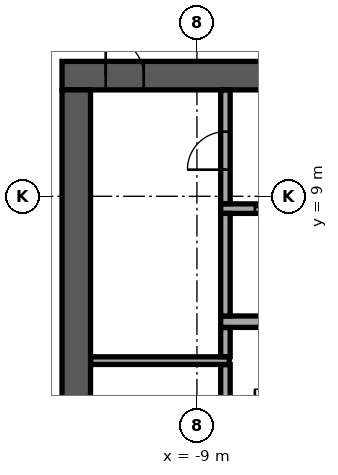
"""IFC4 building model, lengths in metres.
Left out: names, types, materials, properties, quantities, classifications, styles, units other than length and angle.
Written with IfcOpenShell. Run it as: python <this file> out.ifc"""

import sys

from ifc_helpers import new_model, si_unit, direction, frame, frame_2d, origin, place, context, subcontext, project, spatial, rectangle, extrude, element, fill, save


model = new_model("IFC4")
c1 = context("Model", 3, precision=1e-05, world=origin(), true_north=direction((0.0, 1.0)))
c2 = subcontext(c1, "Body", "Model", "MODEL_VIEW")
j1 = project(units=[si_unit("LENGTHUNIT", "METRE"), si_unit("PLANEANGLEUNIT", "RADIAN")], contexts=[c1])
p1 = place(None, origin())
s1 = spatial("IfcSite", under=j1, at=p1, CompositionType="ELEMENT")
p2 = place(p1, origin())
s2 = spatial("IfcBuilding", under=s1, at=p2, CompositionType="ELEMENT")
p3 = place(p2, frame((0.0, 0.0, 254.9)))
s3 = spatial("IfcBuildingStorey", under=s2, at=p3, CompositionType="ELEMENT", Elevation=254.9)
p4 = place(p3, frame((-12.55, 12.175, 0.0), z_axis=(0.0, 0.0, 1.0), x_axis=(1.0, 0.0, 0.0)))
e1 = element("IfcWall", 1, at=p4, inside=s3, PredefinedType="SHEAR", context=c2, shape_type="SweptSolid", body=[
    extrude(rectangle(XDim=25.1, YDim=0.75, at=frame_2d((12.55, 0.0))), origin(), (0.0, 0.0, 1.0), 3.64),
])
p5 = place(p4, frame((11.35, 0.0, 0.0)))
e2 = element("IfcOpeningElement", 2, at=p5, cuts=e1, PredefinedType="OPENING", context=c2, shape_type="SweptSolid", body=[
    extrude(rectangle(XDim=2.4, YDim=2.4, at=frame_2d((1.2, 1.2))), frame((0.0, 0.385, 0.0), z_axis=(0.0, -1.0, 0.0), x_axis=(1.0, 0.0, 0.0)), (0.0, 0.0, 1.0), 0.77),
])
p6 = place(p4, frame((22.175, 0.0, 0.0)))
e3 = element("IfcOpeningElement", 3, at=p6, cuts=e1, PredefinedType="OPENING", context=c2, shape_type="SweptSolid", body=[
    extrude(rectangle(XDim=1.2, YDim=2.1, at=frame_2d((0.6, 1.05))), frame((0.0, 0.385, 0.0), z_axis=(0.0, -1.0, 0.0), x_axis=(1.0, 0.0, 0.0)), (0.0, 0.0, 1.0), 0.77),
])
p7 = place(p4, frame((1.15, 0.0, 0.0)))
e4 = element("IfcOpeningElement", 4, at=p7, cuts=e1, PredefinedType="OPENING", context=c2, shape_type="SweptSolid", body=[
    extrude(rectangle(XDim=1.0, YDim=2.1, at=frame_2d((0.5, 1.05))), frame((0.0, 0.385, 0.0), z_axis=(0.0, -1.0, 0.0), x_axis=(1.0, 0.0, 0.0)), (0.0, 0.0, 1.0), 0.77),
])
p8 = place(p3, frame((-12.175, -11.8, 0.0), z_axis=(0.0, 0.0, 1.0), x_axis=(0.0, 1.0, 0.0)))
e5 = element("IfcWall", 5, at=p8, inside=s3, PredefinedType="SHEAR", context=c2, shape_type="SweptSolid", body=[
    extrude(rectangle(XDim=23.6, YDim=0.75, at=frame_2d((11.8, 0.0))), origin(), (0.0, 0.0, 1.0), 3.64),
])
p9 = place(p8, frame((10.6, 0.0, 0.0)))
e6 = element("IfcOpeningElement", 6, at=p9, cuts=e5, PredefinedType="OPENING", context=c2, shape_type="SweptSolid", body=[
    extrude(rectangle(XDim=2.4, YDim=2.4, at=frame_2d((1.2, 1.2))), frame((0.0, 0.385, 0.0), z_axis=(0.0, -1.0, 0.0), x_axis=(1.0, 0.0, 0.0)), (0.0, 0.0, 1.0), 0.77),
])
p10 = place(p3, frame((-8.375, 5.7, 0.0), z_axis=(0.0, 0.0, 1.0), x_axis=(1.0, 0.0, 0.0)))
e7 = element("IfcWall", 7, at=p10, inside=s3, PredefinedType="SOLIDWALL", context=c2, shape_type="SweptSolid", body=[
    extrude(rectangle(XDim=16.75, YDim=0.3, at=frame_2d((8.375, 0.0))), origin(), (0.0, 0.0, 1.0), 3.64),
])
p11 = place(p3, frame((-8.375, 8.675, 0.0), z_axis=(0.0, 0.0, 1.0), x_axis=(1.0, 0.0, 0.0)))
e8 = element("IfcWall", 8, at=p11, inside=s3, PredefinedType="SOLIDWALL", context=c2, shape_type="SweptSolid", body=[
    extrude(rectangle(XDim=16.75, YDim=0.25, at=frame_2d((8.375, 0.0))), origin(), (0.0, 0.0, 1.0), 3.64),
])
p12 = place(p11, frame((0.9, 0.0, 0.0)))
e9 = element("IfcOpeningElement", 9, at=p12, cuts=e8, PredefinedType="OPENING", context=c2, shape_type="SweptSolid", body=[
    extrude(rectangle(XDim=1.2, YDim=2.1, at=frame_2d((0.6, 1.05))), frame((0.0, 0.135, 0.0), z_axis=(0.0, -1.0, 0.0), x_axis=(1.0, 0.0, 0.0)), (0.0, 0.0, 1.0), 0.27),
])
p13 = place(p11, frame((3.65, 0.0, 0.0)))
e10 = element("IfcOpeningElement", 10, at=p13, cuts=e8, PredefinedType="OPENING", context=c2, shape_type="SweptSolid", body=[
    extrude(rectangle(XDim=1.2, YDim=2.1, at=frame_2d((0.6, 1.05))), frame((0.0, 0.135, 0.0), z_axis=(0.0, -1.0, 0.0), x_axis=(1.0, 0.0, 0.0)), (0.0, 0.0, 1.0), 0.27),
])
p14 = place(p11, frame((6.4, 0.0, 0.0)))
e11 = element("IfcOpeningElement", 11, at=p14, cuts=e8, PredefinedType="OPENING", context=c2, shape_type="SweptSolid", body=[
    extrude(rectangle(XDim=1.2, YDim=2.1, at=frame_2d((0.6, 1.05))), frame((0.0, 0.135, 0.0), z_axis=(0.0, -1.0, 0.0), x_axis=(1.0, 0.0, 0.0)), (0.0, 0.0, 1.0), 0.27),
])
p15 = place(p11, frame((9.15, 0.0, 0.0)))
e12 = element("IfcOpeningElement", 12, at=p15, cuts=e8, PredefinedType="OPENING", context=c2, shape_type="SweptSolid", body=[
    extrude(rectangle(XDim=1.2, YDim=2.1, at=frame_2d((0.6, 1.05))), frame((0.0, 0.135, 0.0), z_axis=(0.0, -1.0, 0.0), x_axis=(1.0, 0.0, 0.0)), (0.0, 0.0, 1.0), 0.27),
])
p16 = place(p11, frame((11.9, 0.0, 0.0)))
e13 = element("IfcOpeningElement", 13, at=p16, cuts=e8, PredefinedType="OPENING", context=c2, shape_type="SweptSolid", body=[
    extrude(rectangle(XDim=1.2, YDim=2.1, at=frame_2d((0.6, 1.05))), frame((0.0, 0.135, 0.0), z_axis=(0.0, -1.0, 0.0), x_axis=(1.0, 0.0, 0.0)), (0.0, 0.0, 1.0), 0.27),
])
p17 = place(p11, frame((14.65, 0.0, 0.0)))
e14 = element("IfcOpeningElement", 14, at=p17, cuts=e8, PredefinedType="OPENING", context=c2, shape_type="SweptSolid", body=[
    extrude(rectangle(XDim=1.2, YDim=2.1, at=frame_2d((0.6, 1.05))), frame((0.0, 0.135, 0.0), z_axis=(0.0, -1.0, 0.0), x_axis=(1.0, 0.0, 0.0)), (0.0, 0.0, 1.0), 0.27),
])
p18 = place(p3, frame((-8.25, 5.85, 0.0), z_axis=(0.0, 0.0, 1.0), x_axis=(0.0, 1.0, 0.0)))
e15 = element("IfcWall", 15, at=p18, inside=s3, PredefinedType="SOLIDWALL", context=c2, shape_type="SweptSolid", body=[
    extrude(rectangle(XDim=2.7, YDim=0.25, at=frame_2d((1.35, 0.0))), origin(), (0.0, 0.0, 1.0), 3.64),
])
p19 = place(p3, frame((-8.25, 2.855, 0.0), z_axis=(0.0, 0.0, 1.0), x_axis=(0.0, 1.0, 0.0)))
e16 = element("IfcWall", 16, at=p19, inside=s3, PredefinedType="PARTITIONING", context=c2, shape_type="SweptSolid", body=[
    extrude(rectangle(XDim=1.715, YDim=0.25, at=frame_2d((0.857, 0.0))), origin(), (0.0, 0.0, 1.0), 3.64),
])
p20 = place(p3, frame((-11.795, 4.675, 0.0), z_axis=(0.0, 0.0, 1.0), x_axis=(1.0, 0.0, 0.0)))
e17 = element("IfcWall", 17, at=p20, inside=s3, PredefinedType="PARTITIONING", context=c2, shape_type="SweptSolid", body=[
    extrude(rectangle(XDim=3.645, YDim=0.2, at=frame_2d((1.823, 0.0))), origin(), (0.0, 0.0, 1.0), 3.64),
])
p21 = place(p3, frame((-8.25, 4.78, 0.0), z_axis=(0.0, 0.0, 1.0), x_axis=(0.0, 1.0, 0.0)))
e18 = element("IfcWall", 18, at=p21, inside=s3, PredefinedType="PARTITIONING", context=c2, shape_type="SweptSolid", body=[
    extrude(rectangle(XDim=0.765, YDim=0.25, at=frame_2d((0.382, 0.0))), origin(), (0.0, 0.0, 1.0), 3.64),
])
p22 = place(p3, frame((-8.25, 8.805, 0.0), z_axis=(0.0, 0.0, 1.0), x_axis=(0.0, 1.0, 0.0)))
e19 = element("IfcWall", 19, at=p22, inside=s3, PredefinedType="PARTITIONING", context=c2, shape_type="SweptSolid", body=[
    extrude(rectangle(XDim=2.99, YDim=0.25, at=frame_2d((1.495, 0.0))), origin(), (0.0, 0.0, 1.0), 3.64),
])
p23 = place(p22, frame((0.895, 0.0, 0.0)))
e20 = element("IfcOpeningElement", 20, at=p23, cuts=e19, PredefinedType="OPENING", context=c2, shape_type="SweptSolid", body=[
    extrude(rectangle(XDim=1.0, YDim=2.1, at=frame_2d((0.5, 1.05))), frame((0.0, 0.135, 0.0), z_axis=(0.0, -1.0, 0.0), x_axis=(1.0, 0.0, 0.0)), (0.0, 0.0, 1.0), 0.27),
])
p24 = place(p3, frame((-6.281, 33.292, 0.0), z_axis=(0.0, 0.0, 1.0), x_axis=(-0.544637268583, -0.838671715077, 0.0)))
e21 = element("IfcWall", 21, at=p24, inside=s3, PredefinedType="STANDARD", context=c2, shape_type="SweptSolid", body=[
    extrude(rectangle(XDim=48.843, YDim=0.6, at=frame_2d((24.422, 0.0))), origin(), (0.0, 0.0, 1.0), 3.64),
])
p25 = place(p24, frame((1.22, 0.0, 0.9)))
e22 = element("IfcOpeningElement", 22, at=p25, cuts=e21, PredefinedType="OPENING", context=c2, shape_type="SweptSolid", body=[
    extrude(rectangle(XDim=2.0, YDim=2.1, at=frame_2d((1.0, 1.05))), frame((0.0, 0.31, 0.0), z_axis=(0.0, -1.0, 0.0), x_axis=(1.0, 0.0, 0.0)), (0.0, 0.0, 1.0), 0.62),
])
p26 = place(p24, frame((5.66, 0.0, 0.9)))
e23 = element("IfcOpeningElement", 23, at=p26, cuts=e21, PredefinedType="OPENING", context=c2, shape_type="SweptSolid", body=[
    extrude(rectangle(XDim=2.0, YDim=2.1, at=frame_2d((1.0, 1.05))), frame((0.0, 0.31, 0.0), z_axis=(0.0, -1.0, 0.0), x_axis=(1.0, 0.0, 0.0)), (0.0, 0.0, 1.0), 0.62),
])
p27 = place(p24, frame((14.541, 0.0, 0.9)))
e24 = element("IfcOpeningElement", 24, at=p27, cuts=e21, PredefinedType="OPENING", context=c2, shape_type="SweptSolid", body=[
    extrude(rectangle(XDim=2.0, YDim=2.1, at=frame_2d((1.0, 1.05))), frame((0.0, 0.31, 0.0), z_axis=(0.0, -1.0, 0.0), x_axis=(1.0, 0.0, 0.0)), (0.0, 0.0, 1.0), 0.62),
])
p28 = place(p24, frame((18.981, 0.0, 0.9)))
e25 = element("IfcOpeningElement", 25, at=p28, cuts=e21, PredefinedType="OPENING", context=c2, shape_type="SweptSolid", body=[
    extrude(rectangle(XDim=2.0, YDim=2.1, at=frame_2d((1.0, 1.05))), frame((0.0, 0.31, 0.0), z_axis=(0.0, -1.0, 0.0), x_axis=(1.0, 0.0, 0.0)), (0.0, 0.0, 1.0), 0.62),
])
p29 = place(p24, frame((23.422, 0.0, 0.9)))
e26 = element("IfcOpeningElement", 26, at=p29, cuts=e21, PredefinedType="OPENING", context=c2, shape_type="SweptSolid", body=[
    extrude(rectangle(XDim=2.0, YDim=2.1, at=frame_2d((1.0, 1.05))), frame((0.0, 0.31, 0.0), z_axis=(0.0, -1.0, 0.0), x_axis=(1.0, 0.0, 0.0)), (0.0, 0.0, 1.0), 0.62),
])
p30 = place(p24, frame((27.862, 0.0, 0.9)))
e27 = element("IfcOpeningElement", 27, at=p30, cuts=e21, PredefinedType="OPENING", context=c2, shape_type="SweptSolid", body=[
    extrude(rectangle(XDim=2.0, YDim=2.1, at=frame_2d((1.0, 1.05))), frame((0.0, 0.31, 0.0), z_axis=(0.0, -1.0, 0.0), x_axis=(1.0, 0.0, 0.0)), (0.0, 0.0, 1.0), 0.62),
])
p31 = place(p24, frame((32.302, 0.0, 0.9)))
e28 = element("IfcOpeningElement", 28, at=p31, cuts=e21, PredefinedType="OPENING", context=c2, shape_type="SweptSolid", body=[
    extrude(rectangle(XDim=2.0, YDim=2.1, at=frame_2d((1.0, 1.05))), frame((0.0, 0.31, 0.0), z_axis=(0.0, -1.0, 0.0), x_axis=(1.0, 0.0, 0.0)), (0.0, 0.0, 1.0), 0.62),
])
p32 = place(p24, frame((36.742, 0.0, 0.9)))
e29 = element("IfcOpeningElement", 29, at=p32, cuts=e21, PredefinedType="OPENING", context=c2, shape_type="SweptSolid", body=[
    extrude(rectangle(XDim=2.0, YDim=2.1, at=frame_2d((1.0, 1.05))), frame((0.0, 0.31, 0.0), z_axis=(0.0, -1.0, 0.0), x_axis=(1.0, 0.0, 0.0)), (0.0, 0.0, 1.0), 0.62),
])
p33 = place(p24, frame((41.183, 0.0, 0.9)))
e30 = element("IfcOpeningElement", 30, at=p33, cuts=e21, PredefinedType="OPENING", context=c2, shape_type="SweptSolid", body=[
    extrude(rectangle(XDim=2.0, YDim=2.1, at=frame_2d((1.0, 1.05))), frame((0.0, 0.31, 0.0), z_axis=(0.0, -1.0, 0.0), x_axis=(1.0, 0.0, 0.0)), (0.0, 0.0, 1.0), 0.62),
])
p34 = place(p24, frame((45.623, 0.0, 0.9)))
e31 = element("IfcOpeningElement", 31, at=p34, cuts=e21, PredefinedType="OPENING", context=c2, shape_type="SweptSolid", body=[
    extrude(rectangle(XDim=2.0, YDim=2.1, at=frame_2d((1.0, 1.05))), frame((0.0, 0.31, 0.0), z_axis=(0.0, -1.0, 0.0), x_axis=(1.0, 0.0, 0.0)), (0.0, 0.0, 1.0), 0.62),
])
p35 = place(p7, origin())
e32 = element("IfcDoor", 32, at=p35, inside=s3, OperationType="SINGLE_SWING_LEFT", PredefinedType="DOOR", context=c2, shape_type="SweptSolid", body=[
    extrude(rectangle(XDim=1.0, YDim=2.1, at=frame_2d((0.5, 1.05))), frame((0.0, 0.025, 0.0), z_axis=(0.0, -1.0, 0.0), x_axis=(1.0, 0.0, 0.0)), (0.0, 0.0, 1.0), 0.05),
])
fill(e4, e32)
p36 = place(p12, origin())
e33 = element("IfcDoor", 33, at=p36, inside=s3, OperationType="DOUBLE_DOOR_SLIDING", PredefinedType="DOOR", context=c2, shape_type="SweptSolid", body=[
    extrude(rectangle(XDim=1.2, YDim=2.1, at=frame_2d((0.6, 1.05))), frame((0.0, 0.025, 0.0), z_axis=(0.0, -1.0, 0.0), x_axis=(1.0, 0.0, 0.0)), (0.0, 0.0, 1.0), 0.05),
])
fill(e9, e33)
p37 = place(p23, origin())
e34 = element("IfcDoor", 34, at=p37, inside=s3, OperationType="SINGLE_SWING_LEFT", PredefinedType="DOOR", context=c2, shape_type="SweptSolid", body=[
    extrude(rectangle(XDim=1.0, YDim=2.1, at=frame_2d((0.5, 1.05))), frame((0.0, 0.025, 0.0), z_axis=(0.0, -1.0, 0.0), x_axis=(1.0, 0.0, 0.0)), (0.0, 0.0, 1.0), 0.05),
])
fill(e20, e34)
save(model, sys.argv[1])
